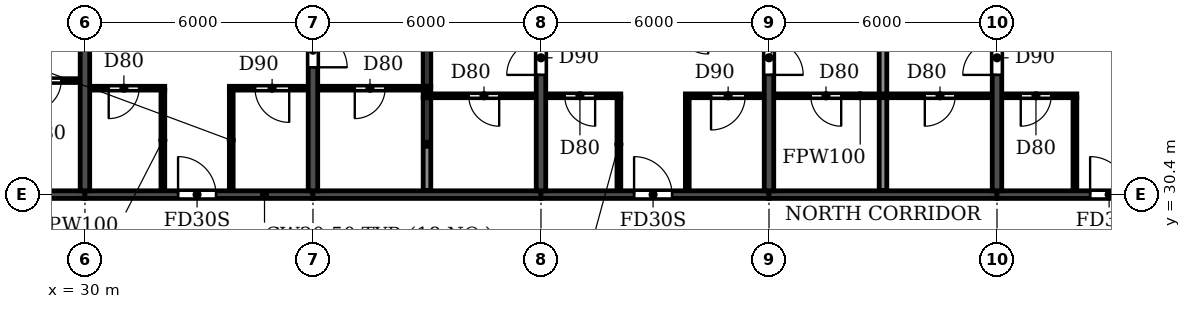
"""IFC4 building model, lengths in metres.
Left out: names, types, materials, properties, quantities, classifications, styles, units other than length and angle.
Written with IfcOpenShell. Run it as: python <this file> out.ifc"""

import sys

from ifc_helpers import new_model, si_unit, direction, frame, frame_2d, origin, place, context, subcontext, project, spatial, rectangle, extrude, element, fill, save


model = new_model("IFC4")
c1 = context("Model", 3, precision=1e-05, world=origin(), true_north=direction((0.0, 1.0)))
c2 = subcontext(c1, "Body", "Model", "MODEL_VIEW")
j1 = project(units=[si_unit("LENGTHUNIT", "METRE"), si_unit("PLANEANGLEUNIT", "RADIAN")], contexts=[c1])
p1 = place(None, origin())
s1 = spatial("IfcSite", under=j1, at=p1, CompositionType="ELEMENT")
p2 = place(p1, origin())
s2 = spatial("IfcBuilding", under=s1, at=p2, CompositionType="ELEMENT")
p3 = place(p2, frame((0.0, 0.0, 191.7)))
s3 = spatial("IfcBuildingStorey", under=s2, at=p3, CompositionType="ELEMENT", Elevation=191.7)
p4 = place(p3, frame((30.0, 30.5, 0.0), z_axis=(0.0, 0.0, 1.0), x_axis=(0.0, 1.0, 0.0)))
e1 = element("IfcWall", 1, at=p4, inside=s3, PredefinedType="SHEAR", context=c2, shape_type="SweptSolid", body=[
    extrude(rectangle(XDim=10.5, YDim=0.25, at=frame_2d((5.25, 0.0))), origin(), (0.0, 0.0, 1.0), 3.08),
])
p5 = place(p3, frame((36.0, 30.5, 0.0), z_axis=(0.0, 0.0, 1.0), x_axis=(0.0, 1.0, 0.0)))
e2 = element("IfcWall", 2, at=p5, inside=s3, PredefinedType="SHEAR", context=c2, shape_type="SweptSolid", body=[
    extrude(rectangle(XDim=10.5, YDim=0.25, at=frame_2d((5.25, 0.0))), origin(), (0.0, 0.0, 1.0), 3.08),
])
p6 = place(p5, frame((3.25, 0.0, 0.0)))
e3 = element("IfcOpeningElement", 3, at=p6, cuts=e2, PredefinedType="OPENING", context=c2, shape_type="SweptSolid", body=[
    extrude(rectangle(XDim=0.9, YDim=2.1, at=frame_2d((0.45, 1.05))), frame((0.0, 0.135, 0.0), z_axis=(0.0, -1.0, 0.0), x_axis=(1.0, 0.0, 0.0)), (0.0, 0.0, 1.0), 0.27),
])
p7 = place(p3, frame((42.0, 30.5, 0.0), z_axis=(0.0, 0.0, 1.0), x_axis=(0.0, 1.0, 0.0)))
e4 = element("IfcWall", 4, at=p7, inside=s3, PredefinedType="SHEAR", context=c2, shape_type="SweptSolid", body=[
    extrude(rectangle(XDim=10.5, YDim=0.25, at=frame_2d((5.25, 0.0))), origin(), (0.0, 0.0, 1.0), 3.08),
])
p8 = place(p7, frame((3.05, 0.0, 0.0)))
e5 = element("IfcOpeningElement", 5, at=p8, cuts=e4, PredefinedType="OPENING", context=c2, shape_type="SweptSolid", body=[
    extrude(rectangle(XDim=0.9, YDim=2.1, at=frame_2d((0.45, 1.05))), frame((0.0, 0.135, 0.0), z_axis=(0.0, -1.0, 0.0), x_axis=(1.0, 0.0, 0.0)), (0.0, 0.0, 1.0), 0.27),
])
p9 = place(p3, frame((48.0, 30.5, 0.0), z_axis=(0.0, 0.0, 1.0), x_axis=(0.0, 1.0, 0.0)))
e6 = element("IfcWall", 6, at=p9, inside=s3, PredefinedType="SHEAR", context=c2, shape_type="SweptSolid", body=[
    extrude(rectangle(XDim=10.5, YDim=0.25, at=frame_2d((5.25, 0.0))), origin(), (0.0, 0.0, 1.0), 3.08),
])
p10 = place(p9, frame((3.05, 0.0, 0.0)))
e7 = element("IfcOpeningElement", 7, at=p10, cuts=e6, PredefinedType="OPENING", context=c2, shape_type="SweptSolid", body=[
    extrude(rectangle(XDim=0.9, YDim=2.1, at=frame_2d((0.45, 1.05))), frame((0.0, 0.135, 0.0), z_axis=(0.0, -1.0, 0.0), x_axis=(1.0, 0.0, 0.0)), (0.0, 0.0, 1.0), 0.27),
])
p11 = place(p3, frame((54.0, 30.5, 0.0), z_axis=(0.0, 0.0, 1.0), x_axis=(0.0, 1.0, 0.0)))
e8 = element("IfcWall", 8, at=p11, inside=s3, PredefinedType="SHEAR", context=c2, shape_type="SweptSolid", body=[
    extrude(rectangle(XDim=10.5, YDim=0.25, at=frame_2d((5.25, 0.0))), origin(), (0.0, 0.0, 1.0), 3.08),
])
p12 = place(p11, frame((3.05, 0.0, 0.0)))
e9 = element("IfcOpeningElement", 9, at=p12, cuts=e8, PredefinedType="OPENING", context=c2, shape_type="SweptSolid", body=[
    extrude(rectangle(XDim=0.9, YDim=2.1, at=frame_2d((0.45, 1.05))), frame((0.0, 0.135, 0.0), z_axis=(0.0, -1.0, 0.0), x_axis=(1.0, 0.0, 0.0)), (0.0, 0.0, 1.0), 0.27),
])
p13 = place(p3, frame((24.0, 30.4, 0.0), z_axis=(0.0, 0.0, 1.0), x_axis=(1.0, 0.0, 0.0)))
e10 = element("IfcWall", 10, at=p13, inside=s3, PredefinedType="SHEAR", context=c2, shape_type="SweptSolid", body=[
    extrude(rectangle(XDim=6.0, YDim=0.2, at=frame_2d((3.0, 0.0))), origin(), (0.0, 0.0, 1.0), 2.48),
])
p14 = place(p13, frame((2.55, 0.0, 0.0)))
e11 = element("IfcOpeningElement", 11, at=p14, cuts=e10, PredefinedType="OPENING", context=c2, shape_type="SweptSolid", body=[
    extrude(rectangle(XDim=1.0, YDim=2.1, at=frame_2d((0.5, 1.05))), frame((0.0, 0.11, 0.0), z_axis=(0.0, -1.0, 0.0), x_axis=(1.0, 0.0, 0.0)), (0.0, 0.0, 1.0), 0.22),
])
p15 = place(p3, frame((30.0, 30.4, 0.0), z_axis=(0.0, 0.0, 1.0), x_axis=(1.0, 0.0, 0.0)))
e12 = element("IfcWall", 12, at=p15, inside=s3, PredefinedType="SHEAR", context=c2, shape_type="SweptSolid", body=[
    extrude(rectangle(XDim=6.0, YDim=0.2, at=frame_2d((3.0, 0.0))), origin(), (0.0, 0.0, 1.0), 2.48),
])
p16 = place(p15, frame((2.45, 0.0, 0.0)))
e13 = element("IfcOpeningElement", 13, at=p16, cuts=e12, PredefinedType="OPENING", context=c2, shape_type="SweptSolid", body=[
    extrude(rectangle(XDim=1.0, YDim=2.1, at=frame_2d((0.5, 1.05))), frame((0.0, 0.11, 0.0), z_axis=(0.0, -1.0, 0.0), x_axis=(1.0, 0.0, 0.0)), (0.0, 0.0, 1.0), 0.22),
])
p17 = place(p3, frame((36.0, 30.4, 0.0), z_axis=(0.0, 0.0, 1.0), x_axis=(1.0, 0.0, 0.0)))
e14 = element("IfcWall", 14, at=p17, inside=s3, PredefinedType="SHEAR", context=c2, shape_type="SweptSolid", body=[
    extrude(rectangle(XDim=6.0, YDim=0.2, at=frame_2d((3.0, 0.0))), origin(), (0.0, 0.0, 1.0), 2.48),
])
p18 = place(p3, frame((42.0, 30.4, 0.0), z_axis=(0.0, 0.0, 1.0), x_axis=(1.0, 0.0, 0.0)))
e15 = element("IfcWall", 15, at=p18, inside=s3, PredefinedType="SHEAR", context=c2, shape_type="SweptSolid", body=[
    extrude(rectangle(XDim=6.0, YDim=0.2, at=frame_2d((3.0, 0.0))), origin(), (0.0, 0.0, 1.0), 2.48),
])
p19 = place(p18, frame((2.45, 0.0, 0.0)))
e16 = element("IfcOpeningElement", 16, at=p19, cuts=e15, PredefinedType="OPENING", context=c2, shape_type="SweptSolid", body=[
    extrude(rectangle(XDim=1.0, YDim=2.1, at=frame_2d((0.5, 1.05))), frame((0.0, 0.11, 0.0), z_axis=(0.0, -1.0, 0.0), x_axis=(1.0, 0.0, 0.0)), (0.0, 0.0, 1.0), 0.22),
])
p20 = place(p3, frame((48.0, 30.4, 0.0), z_axis=(0.0, 0.0, 1.0), x_axis=(1.0, 0.0, 0.0)))
e17 = element("IfcWall", 17, at=p20, inside=s3, PredefinedType="SHEAR", context=c2, shape_type="SweptSolid", body=[
    extrude(rectangle(XDim=6.0, YDim=0.2, at=frame_2d((3.0, 0.0))), origin(), (0.0, 0.0, 1.0), 2.48),
])
p21 = place(p3, frame((54.0, 30.4, 0.0), z_axis=(0.0, 0.0, 1.0), x_axis=(1.0, 0.0, 0.0)))
e18 = element("IfcWall", 18, at=p21, inside=s3, PredefinedType="SHEAR", context=c2, shape_type="SweptSolid", body=[
    extrude(rectangle(XDim=6.0, YDim=0.2, at=frame_2d((3.0, 0.0))), origin(), (0.0, 0.0, 1.0), 2.48),
])
p22 = place(p21, frame((2.45, 0.0, 0.0)))
e19 = element("IfcOpeningElement", 19, at=p22, cuts=e18, PredefinedType="OPENING", context=c2, shape_type="SweptSolid", body=[
    extrude(rectangle(XDim=1.0, YDim=2.1, at=frame_2d((0.5, 1.05))), frame((0.0, 0.11, 0.0), z_axis=(0.0, -1.0, 0.0), x_axis=(1.0, 0.0, 0.0)), (0.0, 0.0, 1.0), 0.22),
])
p23 = place(p3, frame((39.0, 30.51, 0.0), z_axis=(0.0, 0.0, 1.0), x_axis=(0.0, 1.0, 0.0)))
e20 = element("IfcWall", 20, at=p23, inside=s3, PredefinedType="PARTITIONING", context=c2, shape_type="SweptSolid", body=[
    extrude(rectangle(XDim=2.44, YDim=0.2, at=frame_2d((1.22, 0.0))), origin(), (0.0, 0.0, 1.0), 3.08),
])
p24 = place(p3, frame((39.0, 33.25, 0.0), z_axis=(0.0, 0.0, 1.0), x_axis=(0.0, 1.0, 0.0)))
e21 = element("IfcWall", 21, at=p24, inside=s3, PredefinedType="PARTITIONING", context=c2, shape_type="SweptSolid", body=[
    extrude(rectangle(XDim=7.89, YDim=0.2, at=frame_2d((3.945, 0.0))), origin(), (0.0, 0.0, 1.0), 3.08),
])
p25 = place(p3, frame((51.0, 30.51, 0.0), z_axis=(0.0, 0.0, 1.0), x_axis=(0.0, 1.0, 0.0)))
e22 = element("IfcWall", 22, at=p25, inside=s3, PredefinedType="PARTITIONING", context=c2, shape_type="SweptSolid", body=[
    extrude(rectangle(XDim=10.63, YDim=0.2, at=frame_2d((5.315, 0.0))), origin(), (0.0, 0.0, 1.0), 3.08),
])
p26 = place(p3, frame((38.9, 33.0, 0.0), z_axis=(0.0, 0.0, 1.0), x_axis=(1.0, 0.0, 0.0)))
e23 = element("IfcWall", 23, at=p26, inside=s3, PredefinedType="PARTITIONING", context=c2, shape_type="SweptSolid", body=[
    extrude(rectangle(XDim=2.965, YDim=0.1, at=frame_2d((1.482, 0.0))), origin(), (0.0, 0.0, 1.0), 3.08),
])
p27 = place(p26, frame((1.2, 0.0, 0.0)))
e24 = element("IfcOpeningElement", 24, at=p27, cuts=e23, PredefinedType="OPENING", context=c2, shape_type="SweptSolid", body=[
    extrude(rectangle(XDim=0.8, YDim=2.1, at=frame_2d((0.4, 1.05))), frame((0.0, 0.06, 0.0), z_axis=(0.0, -1.0, 0.0), x_axis=(1.0, 0.0, 0.0)), (0.0, 0.0, 1.0), 0.12),
])
p28 = place(p3, frame((42.135, 33.0, 0.0), z_axis=(0.0, 0.0, 1.0), x_axis=(1.0, 0.0, 0.0)))
e25 = element("IfcWall", 25, at=p28, inside=s3, PredefinedType="PARTITIONING", context=c2, shape_type="SweptSolid", body=[
    extrude(rectangle(XDim=1.965, YDim=0.1, at=frame_2d((0.982, 0.0))), origin(), (0.0, 0.0, 1.0), 3.08),
])
p29 = place(p28, frame((0.49, 0.0, 0.0)))
e26 = element("IfcOpeningElement", 26, at=p29, cuts=e25, PredefinedType="OPENING", context=c2, shape_type="SweptSolid", body=[
    extrude(rectangle(XDim=0.8, YDim=2.1, at=frame_2d((0.4, 1.05))), frame((0.0, 0.06, 0.0), z_axis=(0.0, -1.0, 0.0), x_axis=(1.0, 0.0, 0.0)), (0.0, 0.0, 1.0), 0.12),
])
p30 = place(p3, frame((45.8, 33.0, 0.0), z_axis=(0.0, 0.0, 1.0), x_axis=(1.0, 0.0, 0.0)))
e27 = element("IfcWall", 27, at=p30, inside=s3, PredefinedType="PARTITIONING", context=c2, shape_type="SweptSolid", body=[
    extrude(rectangle(XDim=2.065, YDim=0.1, at=frame_2d((1.032, 0.0))), origin(), (0.0, 0.0, 1.0), 3.08),
])
p31 = place(p30, frame((0.675, 0.0, 0.0)))
e28 = element("IfcOpeningElement", 28, at=p31, cuts=e27, PredefinedType="OPENING", context=c2, shape_type="SweptSolid", body=[
    extrude(rectangle(XDim=0.9, YDim=2.1, at=frame_2d((0.45, 1.05))), frame((0.0, 0.06, 0.0), z_axis=(0.0, -1.0, 0.0), x_axis=(1.0, 0.0, 0.0)), (0.0, 0.0, 1.0), 0.12),
])
p32 = place(p3, frame((48.135, 33.0, 0.0), z_axis=(0.0, 0.0, 1.0), x_axis=(1.0, 0.0, 0.0)))
e29 = element("IfcWall", 29, at=p32, inside=s3, PredefinedType="PARTITIONING", context=c2, shape_type="SweptSolid", body=[
    extrude(rectangle(XDim=5.73, YDim=0.1, at=frame_2d((2.865, 0.0))), origin(), (0.0, 0.0, 1.0), 3.08),
])
p33 = place(p32, frame((0.965, 0.0, 0.0)))
e30 = element("IfcOpeningElement", 30, at=p33, cuts=e29, PredefinedType="OPENING", context=c2, shape_type="SweptSolid", body=[
    extrude(rectangle(XDim=0.8, YDim=2.1, at=frame_2d((0.4, 1.05))), frame((0.0, 0.06, 0.0), z_axis=(0.0, -1.0, 0.0), x_axis=(1.0, 0.0, 0.0)), (0.0, 0.0, 1.0), 0.12),
])
p34 = place(p32, frame((3.965, 0.0, 0.0)))
e31 = element("IfcOpeningElement", 31, at=p34, cuts=e29, PredefinedType="OPENING", context=c2, shape_type="SweptSolid", body=[
    extrude(rectangle(XDim=0.8, YDim=2.1, at=frame_2d((0.4, 1.05))), frame((0.0, 0.06, 0.0), z_axis=(0.0, -1.0, 0.0), x_axis=(1.0, 0.0, 0.0)), (0.0, 0.0, 1.0), 0.12),
])
p35 = place(p3, frame((54.135, 33.0, 0.0), z_axis=(0.0, 0.0, 1.0), x_axis=(1.0, 0.0, 0.0)))
e32 = element("IfcWall", 32, at=p35, inside=s3, PredefinedType="PARTITIONING", context=c2, shape_type="SweptSolid", body=[
    extrude(rectangle(XDim=1.965, YDim=0.1, at=frame_2d((0.982, 0.0))), origin(), (0.0, 0.0, 1.0), 3.08),
])
p36 = place(p35, frame((0.49, 0.0, 0.0)))
e33 = element("IfcOpeningElement", 33, at=p36, cuts=e32, PredefinedType="OPENING", context=c2, shape_type="SweptSolid", body=[
    extrude(rectangle(XDim=0.8, YDim=2.1, at=frame_2d((0.4, 1.05))), frame((0.0, 0.06, 0.0), z_axis=(0.0, -1.0, 0.0), x_axis=(1.0, 0.0, 0.0)), (0.0, 0.0, 1.0), 0.12),
])
p37 = place(p3, frame((30.135, 33.2, 0.0), z_axis=(0.0, 0.0, 1.0), x_axis=(1.0, 0.0, 0.0)))
e34 = element("IfcWall", 34, at=p37, inside=s3, PredefinedType="PARTITIONING", context=c2, shape_type="SweptSolid", body=[
    extrude(rectangle(XDim=1.965, YDim=0.1, at=frame_2d((0.982, 0.0))), origin(), (0.0, 0.0, 1.0), 3.08),
])
p38 = place(p37, frame((0.49, 0.0, 0.0)))
e35 = element("IfcOpeningElement", 35, at=p38, cuts=e34, PredefinedType="OPENING", context=c2, shape_type="SweptSolid", body=[
    extrude(rectangle(XDim=0.8, YDim=2.1, at=frame_2d((0.4, 1.05))), frame((0.0, 0.06, 0.0), z_axis=(0.0, -1.0, 0.0), x_axis=(1.0, 0.0, 0.0)), (0.0, 0.0, 1.0), 0.12),
])
p39 = place(p3, frame((33.8, 33.2, 0.0), z_axis=(0.0, 0.0, 1.0), x_axis=(1.0, 0.0, 0.0)))
e36 = element("IfcWall", 36, at=p39, inside=s3, PredefinedType="PARTITIONING", context=c2, shape_type="SweptSolid", body=[
    extrude(rectangle(XDim=2.065, YDim=0.1, at=frame_2d((1.032, 0.0))), origin(), (0.0, 0.0, 1.0), 3.08),
])
p40 = place(p39, frame((0.675, 0.0, 0.0)))
e37 = element("IfcOpeningElement", 37, at=p40, cuts=e36, PredefinedType="OPENING", context=c2, shape_type="SweptSolid", body=[
    extrude(rectangle(XDim=0.9, YDim=2.1, at=frame_2d((0.45, 1.05))), frame((0.0, 0.06, 0.0), z_axis=(0.0, -1.0, 0.0), x_axis=(1.0, 0.0, 0.0)), (0.0, 0.0, 1.0), 0.12),
])
p41 = place(p3, frame((36.135, 33.2, 0.0), z_axis=(0.0, 0.0, 1.0), x_axis=(1.0, 0.0, 0.0)))
e38 = element("IfcWall", 38, at=p41, inside=s3, PredefinedType="PARTITIONING", context=c2, shape_type="SweptSolid", body=[
    extrude(rectangle(XDim=2.965, YDim=0.1, at=frame_2d((1.482, 0.0))), origin(), (0.0, 0.0, 1.0), 3.08),
])
p42 = place(p41, frame((0.965, 0.0, 0.0)))
e39 = element("IfcOpeningElement", 39, at=p42, cuts=e38, PredefinedType="OPENING", context=c2, shape_type="SweptSolid", body=[
    extrude(rectangle(XDim=0.8, YDim=2.1, at=frame_2d((0.4, 1.05))), frame((0.0, 0.06, 0.0), z_axis=(0.0, -1.0, 0.0), x_axis=(1.0, 0.0, 0.0)), (0.0, 0.0, 1.0), 0.12),
])
p43 = place(p3, frame((27.9, 33.4, 0.0), z_axis=(0.0, 0.0, 1.0), x_axis=(1.0, 0.0, 0.0)))
e40 = element("IfcWall", 40, at=p43, inside=s3, PredefinedType="PARTITIONING", context=c2, shape_type="SweptSolid", body=[
    extrude(rectangle(XDim=1.965, YDim=0.1, at=frame_2d((0.982, 0.0))), origin(), (0.0, 0.0, 1.0), 3.08),
])
p44 = place(p43, frame((0.675, 0.0, 0.0)))
e41 = element("IfcOpeningElement", 41, at=p44, cuts=e40, PredefinedType="OPENING", context=c2, shape_type="SweptSolid", body=[
    extrude(rectangle(XDim=0.8, YDim=2.1, at=frame_2d((0.4, 1.05))), frame((0.0, 0.06, 0.0), z_axis=(0.0, -1.0, 0.0), x_axis=(1.0, 0.0, 0.0)), (0.0, 0.0, 1.0), 0.12),
])
for number, where, z_axis, x_axis in (
    (42, (32.05, 30.51, 0.0), (0.0, 0.0, 1.0), (0.0, 1.0, 0.0)),
    (43, (33.85, 30.51, 0.0), (0.0, 0.0, 1.0), (0.0, 1.0, 0.0)),
):
    element("IfcWall", number, at=place(p3, frame(where, z_axis=z_axis, x_axis=x_axis)), inside=s3, PredefinedType="PARTITIONING", context=c2, shape_type="SweptSolid", body=[
        extrude(rectangle(XDim=2.64, YDim=0.1, at=frame_2d((1.32, 0.0))), origin(), (0.0, 0.0, 1.0), 3.08),
    ])
for number, where, z_axis, x_axis in (
    (44, (44.05, 30.51, 0.0), (0.0, 0.0, 1.0), (0.0, 1.0, 0.0)),
    (45, (45.85, 30.51, 0.0), (0.0, 0.0, 1.0), (0.0, 1.0, 0.0)),
    (46, (56.05, 30.51, 0.0), (0.0, 0.0, 1.0), (0.0, 1.0, 0.0)),
):
    element("IfcWall", number, at=place(p3, frame(where, z_axis=z_axis, x_axis=x_axis)), inside=s3, PredefinedType="PARTITIONING", context=c2, shape_type="SweptSolid", body=[
        extrude(rectangle(XDim=2.44, YDim=0.1, at=frame_2d((1.22, 0.0))), origin(), (0.0, 0.0, 1.0), 3.08),
    ])
p45 = place(p44, frame((0.8, 0.0, 0.0), z_axis=(0.0, 0.0, 1.0), x_axis=(-1.0, 0.0, 0.0)))
e47 = element("IfcDoor", 47, at=p45, inside=s3, OperationType="SINGLE_SWING_RIGHT", PredefinedType="DOOR", context=c2, shape_type="SweptSolid", body=[
    extrude(rectangle(XDim=0.8, YDim=2.1, at=frame_2d((0.4, 1.05))), frame((0.0, 0.025, 0.0), z_axis=(0.0, -1.0, 0.0), x_axis=(1.0, 0.0, 0.0)), (0.0, 0.0, 1.0), 0.05),
])
fill(e41, e47)
p46 = place(p42, frame((0.8, 0.0, 0.0), z_axis=(0.0, 0.0, 1.0), x_axis=(-1.0, 0.0, 0.0)))
e48 = element("IfcDoor", 48, at=p46, inside=s3, OperationType="SINGLE_SWING_RIGHT", PredefinedType="DOOR", context=c2, shape_type="SweptSolid", body=[
    extrude(rectangle(XDim=0.8, YDim=2.1, at=frame_2d((0.4, 1.05))), frame((0.0, 0.025, 0.0), z_axis=(0.0, -1.0, 0.0), x_axis=(1.0, 0.0, 0.0)), (0.0, 0.0, 1.0), 0.05),
])
fill(e39, e48)
p47 = place(p38, frame((0.8, 0.0, 0.0), z_axis=(0.0, 0.0, 1.0), x_axis=(-1.0, 0.0, 0.0)))
e49 = element("IfcDoor", 49, at=p47, inside=s3, OperationType="SINGLE_SWING_RIGHT", PredefinedType="DOOR", context=c2, shape_type="SweptSolid", body=[
    extrude(rectangle(XDim=0.8, YDim=2.1, at=frame_2d((0.4, 1.05))), frame((0.0, 0.025, 0.0), z_axis=(0.0, -1.0, 0.0), x_axis=(1.0, 0.0, 0.0)), (0.0, 0.0, 1.0), 0.05),
])
fill(e35, e49)
p48 = place(p16, origin())
e50 = element("IfcDoor", 50, at=p48, inside=s3, OperationType="SINGLE_SWING_LEFT", PredefinedType="DOOR", context=c2, shape_type="SweptSolid", body=[
    extrude(rectangle(XDim=1.0, YDim=2.1, at=frame_2d((0.5, 1.05))), frame((0.0, 0.025, 0.0), z_axis=(0.0, -1.0, 0.0), x_axis=(1.0, 0.0, 0.0)), (0.0, 0.0, 1.0), 0.05),
])
fill(e13, e50)
p49 = place(p40, frame((0.9, 0.0, 0.0), z_axis=(0.0, 0.0, 1.0), x_axis=(-1.0, 0.0, 0.0)))
e51 = element("IfcDoor", 51, at=p49, inside=s3, OperationType="SINGLE_SWING_LEFT", PredefinedType="DOOR", context=c2, shape_type="SweptSolid", body=[
    extrude(rectangle(XDim=0.9, YDim=2.1, at=frame_2d((0.45, 1.05))), frame((0.0, 0.025, 0.0), z_axis=(0.0, -1.0, 0.0), x_axis=(1.0, 0.0, 0.0)), (0.0, 0.0, 1.0), 0.05),
])
fill(e37, e51)
p50 = place(p6, frame((0.9, 0.0, 0.0), z_axis=(0.0, 0.0, 1.0), x_axis=(-1.0, 0.0, 0.0)))
e52 = element("IfcDoor", 52, at=p50, inside=s3, OperationType="SINGLE_SWING_RIGHT", PredefinedType="DOOR", context=c2, shape_type="SweptSolid", body=[
    extrude(rectangle(XDim=0.9, YDim=2.1, at=frame_2d((0.45, 1.05))), frame((0.0, 0.025, 0.0), z_axis=(0.0, -1.0, 0.0), x_axis=(1.0, 0.0, 0.0)), (0.0, 0.0, 1.0), 0.05),
])
fill(e3, e52)
p51 = place(p27, frame((0.8, 0.0, 0.0), z_axis=(0.0, 0.0, 1.0), x_axis=(-1.0, 0.0, 0.0)))
e53 = element("IfcDoor", 53, at=p51, inside=s3, OperationType="SINGLE_SWING_LEFT", PredefinedType="DOOR", context=c2, shape_type="SweptSolid", body=[
    extrude(rectangle(XDim=0.8, YDim=2.1, at=frame_2d((0.4, 1.05))), frame((0.0, 0.025, 0.0), z_axis=(0.0, -1.0, 0.0), x_axis=(1.0, 0.0, 0.0)), (0.0, 0.0, 1.0), 0.05),
])
fill(e24, e53)
p52 = place(p33, frame((0.8, 0.0, 0.0), z_axis=(0.0, 0.0, 1.0), x_axis=(-1.0, 0.0, 0.0)))
e54 = element("IfcDoor", 54, at=p52, inside=s3, OperationType="SINGLE_SWING_LEFT", PredefinedType="DOOR", context=c2, shape_type="SweptSolid", body=[
    extrude(rectangle(XDim=0.8, YDim=2.1, at=frame_2d((0.4, 1.05))), frame((0.0, 0.025, 0.0), z_axis=(0.0, -1.0, 0.0), x_axis=(1.0, 0.0, 0.0)), (0.0, 0.0, 1.0), 0.05),
])
fill(e30, e54)
p53 = place(p8, origin())
e55 = element("IfcDoor", 55, at=p53, inside=s3, OperationType="SINGLE_SWING_LEFT", PredefinedType="DOOR", context=c2, shape_type="SweptSolid", body=[
    extrude(rectangle(XDim=0.9, YDim=2.1, at=frame_2d((0.45, 1.05))), frame((0.0, 0.025, 0.0), z_axis=(0.0, -1.0, 0.0), x_axis=(1.0, 0.0, 0.0)), (0.0, 0.0, 1.0), 0.05),
])
fill(e5, e55)
p54 = place(p29, frame((0.8, 0.0, 0.0), z_axis=(0.0, 0.0, 1.0), x_axis=(-1.0, 0.0, 0.0)))
e56 = element("IfcDoor", 56, at=p54, inside=s3, OperationType="SINGLE_SWING_LEFT", PredefinedType="DOOR", context=c2, shape_type="SweptSolid", body=[
    extrude(rectangle(XDim=0.8, YDim=2.1, at=frame_2d((0.4, 1.05))), frame((0.0, 0.025, 0.0), z_axis=(0.0, -1.0, 0.0), x_axis=(1.0, 0.0, 0.0)), (0.0, 0.0, 1.0), 0.05),
])
fill(e26, e56)
p55 = place(p19, origin())
e57 = element("IfcDoor", 57, at=p55, inside=s3, OperationType="SINGLE_SWING_LEFT", PredefinedType="DOOR", context=c2, shape_type="SweptSolid", body=[
    extrude(rectangle(XDim=1.0, YDim=2.1, at=frame_2d((0.5, 1.05))), frame((0.0, 0.025, 0.0), z_axis=(0.0, -1.0, 0.0), x_axis=(1.0, 0.0, 0.0)), (0.0, 0.0, 1.0), 0.05),
])
fill(e16, e57)
p56 = place(p31, frame((0.9, 0.0, 0.0), z_axis=(0.0, 0.0, 1.0), x_axis=(-1.0, 0.0, 0.0)))
e58 = element("IfcDoor", 58, at=p56, inside=s3, OperationType="SINGLE_SWING_RIGHT", PredefinedType="DOOR", context=c2, shape_type="SweptSolid", body=[
    extrude(rectangle(XDim=0.9, YDim=2.1, at=frame_2d((0.45, 1.05))), frame((0.0, 0.025, 0.0), z_axis=(0.0, -1.0, 0.0), x_axis=(1.0, 0.0, 0.0)), (0.0, 0.0, 1.0), 0.05),
])
fill(e28, e58)
p57 = place(p10, frame((0.9, 0.0, 0.0), z_axis=(0.0, 0.0, 1.0), x_axis=(-1.0, 0.0, 0.0)))
e59 = element("IfcDoor", 59, at=p57, inside=s3, OperationType="SINGLE_SWING_RIGHT", PredefinedType="DOOR", context=c2, shape_type="SweptSolid", body=[
    extrude(rectangle(XDim=0.9, YDim=2.1, at=frame_2d((0.45, 1.05))), frame((0.0, 0.025, 0.0), z_axis=(0.0, -1.0, 0.0), x_axis=(1.0, 0.0, 0.0)), (0.0, 0.0, 1.0), 0.05),
])
fill(e7, e59)
p58 = place(p34, frame((0.8, 0.0, 0.0), z_axis=(0.0, 0.0, 1.0), x_axis=(-1.0, 0.0, 0.0)))
e60 = element("IfcDoor", 60, at=p58, inside=s3, OperationType="SINGLE_SWING_RIGHT", PredefinedType="DOOR", context=c2, shape_type="SweptSolid", body=[
    extrude(rectangle(XDim=0.8, YDim=2.1, at=frame_2d((0.4, 1.05))), frame((0.0, 0.025, 0.0), z_axis=(0.0, -1.0, 0.0), x_axis=(1.0, 0.0, 0.0)), (0.0, 0.0, 1.0), 0.05),
])
fill(e31, e60)
p59 = place(p12, origin())
e61 = element("IfcDoor", 61, at=p59, inside=s3, OperationType="SINGLE_SWING_LEFT", PredefinedType="DOOR", context=c2, shape_type="SweptSolid", body=[
    extrude(rectangle(XDim=0.9, YDim=2.1, at=frame_2d((0.45, 1.05))), frame((0.0, 0.025, 0.0), z_axis=(0.0, -1.0, 0.0), x_axis=(1.0, 0.0, 0.0)), (0.0, 0.0, 1.0), 0.05),
])
fill(e9, e61)
p60 = place(p36, frame((0.8, 0.0, 0.0), z_axis=(0.0, 0.0, 1.0), x_axis=(-1.0, 0.0, 0.0)))
e62 = element("IfcDoor", 62, at=p60, inside=s3, OperationType="SINGLE_SWING_RIGHT", PredefinedType="DOOR", context=c2, shape_type="SweptSolid", body=[
    extrude(rectangle(XDim=0.8, YDim=2.1, at=frame_2d((0.4, 1.05))), frame((0.0, 0.025, 0.0), z_axis=(0.0, -1.0, 0.0), x_axis=(1.0, 0.0, 0.0)), (0.0, 0.0, 1.0), 0.05),
])
fill(e33, e62)
p61 = place(p22, origin())
e63 = element("IfcDoor", 63, at=p61, inside=s3, OperationType="SINGLE_SWING_LEFT", PredefinedType="DOOR", context=c2, shape_type="SweptSolid", body=[
    extrude(rectangle(XDim=1.0, YDim=2.1, at=frame_2d((0.5, 1.05))), frame((0.0, 0.025, 0.0), z_axis=(0.0, -1.0, 0.0), x_axis=(1.0, 0.0, 0.0)), (0.0, 0.0, 1.0), 0.05),
])
fill(e19, e63)
save(model, sys.argv[1])
